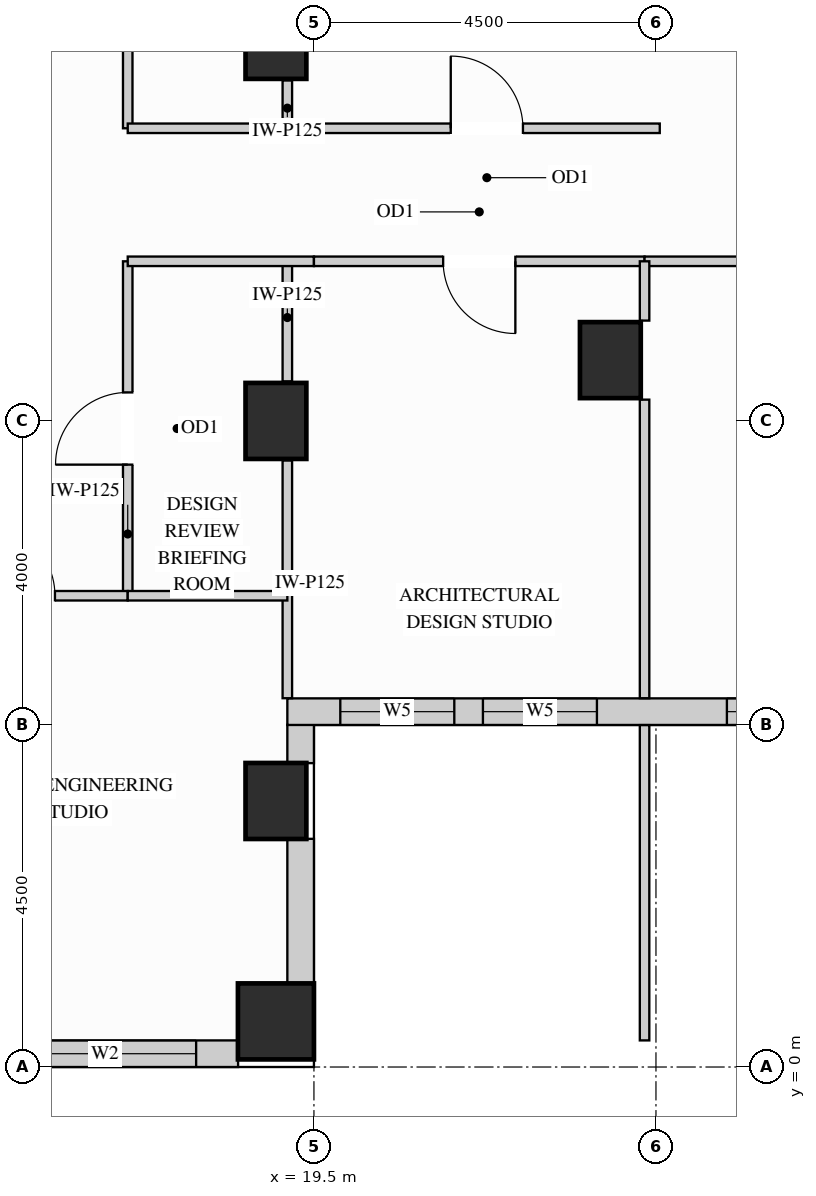
"""IFC4 building model, lengths in metres.
Left out: names, types, materials, properties, quantities, classifications, styles, units other than length and angle.
Written with IfcOpenShell. Run it as: python <this file> out.ifc"""

import sys

from ifc_helpers import new_model, si_unit, direction, frame, frame_2d, origin, origin_2d, place, context, subcontext, project, spatial, rectangle, extrude, source, transform, mapped, element, fill, save


model = new_model("IFC4")
c1 = context("Model", 3, precision=1e-05, world=origin(), true_north=direction((0.0, 1.0)))
c2 = subcontext(c1, "Body", "Model", "MODEL_VIEW")
j1 = project(units=[si_unit("LENGTHUNIT", "METRE"), si_unit("PLANEANGLEUNIT", "RADIAN")], contexts=[c1])
p1 = place(None, origin())
s1 = spatial("IfcSite", under=j1, at=p1, CompositionType="ELEMENT")
p2 = place(p1, origin())
s2 = spatial("IfcBuilding", under=s1, at=p2, CompositionType="ELEMENT")
p3 = place(p2, frame((0.0, 0.0, 150.3)))
s3 = spatial("IfcBuildingStorey", under=s2, at=p3, CompositionType="ELEMENT", Elevation=150.3)
m1 = source(origin(), c2, "Body", "SweptSolid", [
    extrude(rectangle(XDim=0.8, YDim=1.0, at=origin_2d()), origin(), (0.0, 0.0, 1.0), 3.4),
])
for number, where, z_axis, x_axis in (
    (1, (19.0, 13.5, 0.0), (0.0, 0.0, 1.0), (1.0, 0.0, 0.0)),
    (2, (19.0, 3.5, 0.0), (0.0, 0.0, 1.0), (1.0, 0.0, 0.0)),
    (3, (19.0, 8.5, 0.0), (0.0, 0.0, 1.0), (1.0, 0.0, 0.0)),
    (4, (23.4, 9.3, 0.0), (0.0, 0.0, 1.0), (1.0, 0.0, 0.0)),
):
    element("IfcColumn", number, at=place(p3, frame(where, z_axis=z_axis, x_axis=x_axis)), inside=s3, PredefinedType="COLUMN", context=c2, shape_type="MappedRepresentation", body=[
        mapped(m1, transform((0.0, 0.0, 0.0), x_axis=(1.0, 0.0, 0.0), y_axis=(0.0, 1.0, 0.0), z_axis=(0.0, 0.0, 1.0))),
    ])
m2 = source(origin(), c2, "Body", "SweptSolid", [
    extrude(rectangle(XDim=1.0, YDim=1.0, at=origin_2d()), origin(), (0.0, 0.0, 1.0), 3.4),
])
p4 = place(p3, frame((19.0, 0.6, 0.0), z_axis=(0.0, 0.0, 1.0), x_axis=(1.0, 0.0, 0.0)))
e5 = element("IfcColumn", 5, at=p4, inside=s3, PredefinedType="COLUMN", context=c2, shape_type="MappedRepresentation", body=[
    mapped(m2, transform((0.0, 0.0, 0.0), x_axis=(1.0, 0.0, 0.0), y_axis=(0.0, 1.0, 0.0), z_axis=(0.0, 0.0, 1.0))),
])
p5 = place(p3, frame((14.998, 0.175, 0.0), z_axis=(0.0, 0.0, 1.0), x_axis=(1.0, 0.0, 0.0)))
e6 = element("IfcWall", 6, at=p5, inside=s3, PredefinedType="SOLIDWALL", context=c2, shape_type="SweptSolid", body=[
    extrude(rectangle(XDim=3.504, YDim=0.35, at=frame_2d((1.752, 0.0))), origin(), (0.0, 0.0, 1.0), 2.612),
])
p6 = place(p5, frame((0.552, 0.0, 0.78)))
e7 = element("IfcOpeningElement", 7, at=p6, cuts=e6, PredefinedType="OPENING", context=c2, shape_type="SweptSolid", body=[
    extrude(rectangle(XDim=2.4, YDim=1.652, at=frame_2d((1.2, 0.826))), frame((0.0, 0.185, 0.0), z_axis=(0.0, -1.0, 0.0), x_axis=(1.0, 0.0, 0.0)), (0.0, 0.0, 1.0), 0.37),
])
m3 = source(origin(), c2, "Body", "SweptSolid", [
    extrude(rectangle(XDim=1.904, YDim=0.35, at=frame_2d((0.952, 0.0))), origin(), (0.0, 0.0, 1.0), 2.612),
])
p7 = place(p3, frame((19.325, 1.098, 0.0), z_axis=(0.0, 0.0, 1.0), x_axis=(0.0, 1.0, 0.0)))
e8 = element("IfcWall", 8, at=p7, inside=s3, PredefinedType="SOLIDWALL", context=c2, shape_type="MappedRepresentation", body=[
    mapped(m3, transform((0.0, 0.0, 0.0), x_axis=(1.0, 0.0, 0.0), y_axis=(0.0, 1.0, 0.0), z_axis=(0.0, 0.0, 1.0))),
])
m4 = source(origin(), c2, "Body", "SweptSolid", [
    extrude(rectangle(XDim=0.504, YDim=0.35, at=frame_2d((0.252, 0.0))), origin(), (0.0, 0.0, 1.0), 2.773),
])
p8 = place(p3, frame((19.325, 3.998, 0.0), z_axis=(0.0, 0.0, 1.0), x_axis=(0.0, 1.0, 0.0)))
e9 = element("IfcWall", 9, at=p8, inside=s3, PredefinedType="SOLIDWALL", context=c2, shape_type="MappedRepresentation", body=[
    mapped(m4, transform((0.0, 0.0, 0.0), x_axis=(1.0, 0.0, 0.0), y_axis=(0.0, 1.0, 0.0), z_axis=(0.0, 0.0, 1.0))),
])
p9 = place(p3, frame((19.15, 4.675, 0.0), z_axis=(0.0, 0.0, 1.0), x_axis=(1.0, 0.0, 0.0)))
e10 = element("IfcWall", 10, at=p9, inside=s3, PredefinedType="SOLIDWALL", context=c2, shape_type="SweptSolid", body=[
    extrude(rectangle(XDim=15.6, YDim=0.35, at=frame_2d((7.8, 0.0))), origin(), (0.0, 0.0, 1.0), 3.385),
])
p10 = place(p9, frame((0.697, 0.0, 0.78)))
e11 = element("IfcOpeningElement", 11, at=p10, cuts=e10, PredefinedType="OPENING", context=c2, shape_type="SweptSolid", body=[
    extrude(rectangle(XDim=1.5, YDim=2.0, at=frame_2d((0.75, 1.0))), frame((0.0, 0.185, 0.0), z_axis=(0.0, -1.0, 0.0), x_axis=(1.0, 0.0, 0.0)), (0.0, 0.0, 1.0), 0.37),
])
p11 = place(p9, frame((2.573, 0.0, 0.78)))
e12 = element("IfcOpeningElement", 12, at=p11, cuts=e10, PredefinedType="OPENING", context=c2, shape_type="SweptSolid", body=[
    extrude(rectangle(XDim=1.5, YDim=2.0, at=frame_2d((0.75, 1.0))), frame((0.0, 0.185, 0.0), z_axis=(0.0, -1.0, 0.0), x_axis=(1.0, 0.0, 0.0)), (0.0, 0.0, 1.0), 0.37),
])
p12 = place(p9, frame((5.783, 0.0, 0.78)))
e13 = element("IfcOpeningElement", 13, at=p12, cuts=e10, PredefinedType="OPENING", context=c2, shape_type="SweptSolid", body=[
    extrude(rectangle(XDim=1.5, YDim=2.0, at=frame_2d((0.75, 1.0))), frame((0.0, 0.185, 0.0), z_axis=(0.0, -1.0, 0.0), x_axis=(1.0, 0.0, 0.0)), (0.0, 0.0, 1.0), 0.37),
])
p13 = place(p9, frame((8.117, 0.0, 0.78)))
e14 = element("IfcOpeningElement", 14, at=p13, cuts=e10, PredefinedType="OPENING", context=c2, shape_type="SweptSolid", body=[
    extrude(rectangle(XDim=1.5, YDim=2.0, at=frame_2d((0.75, 1.0))), frame((0.0, 0.185, 0.0), z_axis=(0.0, -1.0, 0.0), x_axis=(1.0, 0.0, 0.0)), (0.0, 0.0, 1.0), 0.37),
])
p14 = place(p9, frame((11.393, 0.0, 0.78)))
e15 = element("IfcOpeningElement", 15, at=p14, cuts=e10, PredefinedType="OPENING", context=c2, shape_type="SweptSolid", body=[
    extrude(rectangle(XDim=1.5, YDim=2.0, at=frame_2d((0.75, 1.0))), frame((0.0, 0.185, 0.0), z_axis=(0.0, -1.0, 0.0), x_axis=(1.0, 0.0, 0.0)), (0.0, 0.0, 1.0), 0.37),
])
p15 = place(p9, frame((13.337, 0.0, 0.78)))
e16 = element("IfcOpeningElement", 16, at=p15, cuts=e10, PredefinedType="OPENING", context=c2, shape_type="SweptSolid", body=[
    extrude(rectangle(XDim=1.5, YDim=2.0, at=frame_2d((0.75, 1.0))), frame((0.0, 0.185, 0.0), z_axis=(0.0, -1.0, 0.0), x_axis=(1.0, 0.0, 0.0)), (0.0, 0.0, 1.0), 0.37),
])
m5 = source(origin(), c2, "Body", "SweptSolid", [
    extrude(rectangle(XDim=0.63, YDim=0.125, at=frame_2d((0.315, 0.0))), origin(), (0.0, 0.0, 1.0), 2.773),
])
p16 = place(p3, frame((19.15, 12.35, 0.0), z_axis=(0.0, 0.0, 1.0), x_axis=(0.0, 1.0, 0.0)))
e17 = element("IfcWall", 17, at=p16, inside=s3, PredefinedType="PARTITIONING", context=c2, shape_type="MappedRepresentation", body=[
    mapped(m5, transform((0.0, 0.0, 0.0), x_axis=(1.0, 0.0, 0.0), y_axis=(0.0, 1.0, 0.0), z_axis=(0.0, 0.0, 1.0))),
])
m6 = source(origin(), c2, "Body", "SweptSolid", [
    extrude(rectangle(XDim=3.128, YDim=0.125, at=frame_2d((1.564, 0.0))), origin(), (0.0, 0.0, 1.0), 2.773),
])
p17 = place(p3, frame((19.15, 4.852, 0.0), z_axis=(0.0, 0.0, 1.0), x_axis=(0.0, 1.0, 0.0)))
e18 = element("IfcWall", 18, at=p17, inside=s3, PredefinedType="PARTITIONING", context=c2, shape_type="MappedRepresentation", body=[
    mapped(m6, transform((0.0, 0.0, 0.0), x_axis=(1.0, 0.0, 0.0), y_axis=(0.0, 1.0, 0.0), z_axis=(0.0, 0.0, 1.0))),
])
m7 = source(origin(), c2, "Body", "SweptSolid", [
    extrude(rectangle(XDim=1.58, YDim=0.125, at=frame_2d((0.79, 0.0))), origin(), (0.0, 0.0, 1.0), 2.773),
])
p18 = place(p3, frame((19.15, 9.02, 0.0), z_axis=(0.0, 0.0, 1.0), x_axis=(0.0, 1.0, 0.0)))
e19 = element("IfcWall", 19, at=p18, inside=s3, PredefinedType="PARTITIONING", context=c2, shape_type="MappedRepresentation", body=[
    mapped(m7, transform((0.0, 0.0, 0.0), x_axis=(1.0, 0.0, 0.0), y_axis=(0.0, 1.0, 0.0), z_axis=(0.0, 0.0, 1.0))),
])
p19 = place(p3, frame((17.05, 12.35, 0.0), z_axis=(0.0, 0.0, 1.0), x_axis=(0.0, 1.0, 0.0)))
e20 = element("IfcWall", 20, at=p19, inside=s3, PredefinedType="PARTITIONING", context=c2, shape_type="SweptSolid", body=[
    extrude(rectangle(XDim=3.15, YDim=0.125, at=frame_2d((1.575, 0.0))), origin(), (0.0, 0.0, 1.0), 3.385),
])
p20 = place(p19, frame((1.1, 0.0, 0.0)))
e21 = element("IfcOpeningElement", 21, at=p20, cuts=e20, PredefinedType="OPENING", context=c2, shape_type="SweptSolid", body=[
    extrude(rectangle(XDim=0.95, YDim=2.15, at=frame_2d((0.475, 1.075))), frame((0.0, 0.073, 0.0), z_axis=(0.0, -1.0, 0.0), x_axis=(1.0, 0.0, 0.0)), (0.0, 0.0, 1.0), 0.145),
])
p21 = place(p3, frame((17.05, 6.2, 0.0), z_axis=(0.0, 0.0, 1.0), x_axis=(0.0, 1.0, 0.0)))
e22 = element("IfcWall", 22, at=p21, inside=s3, PredefinedType="PARTITIONING", context=c2, shape_type="SweptSolid", body=[
    extrude(rectangle(XDim=4.4, YDim=0.125, at=frame_2d((2.2, 0.0))), origin(), (0.0, 0.0, 1.0), 3.385),
])
p22 = place(p21, frame((1.725, 0.0, 0.0)))
e23 = element("IfcOpeningElement", 23, at=p22, cuts=e22, PredefinedType="OPENING", context=c2, shape_type="SweptSolid", body=[
    extrude(rectangle(XDim=0.95, YDim=2.15, at=frame_2d((0.475, 1.075))), frame((0.0, 0.073, 0.0), z_axis=(0.0, -1.0, 0.0), x_axis=(1.0, 0.0, 0.0)), (0.0, 0.0, 1.0), 0.145),
])
m8 = source(origin(), c2, "Body", "SweptSolid", [
    extrude(rectangle(XDim=2.45, YDim=0.125, at=frame_2d((1.225, 0.0))), origin(), (0.0, 0.0, 1.0), 3.385),
])
p23 = place(p3, frame((17.05, 12.35, 0.0), z_axis=(0.0, 0.0, 1.0), x_axis=(1.0, 0.0, 0.0)))
e24 = element("IfcWall", 24, at=p23, inside=s3, PredefinedType="PARTITIONING", context=c2, shape_type="MappedRepresentation", body=[
    mapped(m8, transform((0.0, 0.0, 0.0), x_axis=(1.0, 0.0, 0.0), y_axis=(0.0, 1.0, 0.0), z_axis=(0.0, 0.0, 1.0))),
])
p24 = place(p3, frame((19.5, 12.35, 0.0), z_axis=(0.0, 0.0, 1.0), x_axis=(1.0, 0.0, 0.0)))
e25 = element("IfcWall", 25, at=p24, inside=s3, PredefinedType="PARTITIONING", context=c2, shape_type="SweptSolid", body=[
    extrude(rectangle(XDim=4.55, YDim=0.125, at=frame_2d((2.275, 0.0))), origin(), (0.0, 0.0, 1.0), 3.385),
])
p25 = place(p24, frame((1.8, 0.0, 0.0)))
e26 = element("IfcOpeningElement", 26, at=p25, cuts=e25, PredefinedType="OPENING", context=c2, shape_type="SweptSolid", body=[
    extrude(rectangle(XDim=0.95, YDim=2.15, at=frame_2d((0.475, 1.075))), frame((0.0, 0.073, 0.0), z_axis=(0.0, -1.0, 0.0), x_axis=(1.0, 0.0, 0.0)), (0.0, 0.0, 1.0), 0.145),
])
p26 = place(p3, frame((17.05, 10.6, 0.0), z_axis=(0.0, 0.0, 1.0), x_axis=(1.0, 0.0, 0.0)))
e27 = element("IfcWall", 27, at=p26, inside=s3, PredefinedType="PARTITIONING", context=c2, shape_type="MappedRepresentation", body=[
    mapped(m8, transform((0.0, 0.0, 0.0), x_axis=(1.0, 0.0, 0.0), y_axis=(0.0, 1.0, 0.0), z_axis=(0.0, 0.0, 1.0))),
])
p27 = place(p3, frame((19.5, 10.6, 0.0), z_axis=(0.0, 0.0, 1.0), x_axis=(1.0, 0.0, 0.0)))
e28 = element("IfcWall", 28, at=p27, inside=s3, PredefinedType="PARTITIONING", context=c2, shape_type="SweptSolid", body=[
    extrude(rectangle(XDim=4.35, YDim=0.125, at=frame_2d((2.175, 0.0))), origin(), (0.0, 0.0, 1.0), 3.385),
])
p28 = place(p27, frame((1.7, 0.0, 0.0)))
e29 = element("IfcOpeningElement", 29, at=p28, cuts=e28, PredefinedType="OPENING", context=c2, shape_type="SweptSolid", body=[
    extrude(rectangle(XDim=0.95, YDim=2.15, at=frame_2d((0.475, 1.075))), frame((0.0, 0.073, 0.0), z_axis=(0.0, -1.0, 0.0), x_axis=(1.0, 0.0, 0.0)), (0.0, 0.0, 1.0), 0.145),
])
p29 = place(p3, frame((23.85, 10.6, 0.0), z_axis=(0.0, 0.0, 1.0), x_axis=(1.0, 0.0, 0.0)))
e30 = element("IfcWall", 30, at=p29, inside=s3, PredefinedType="PARTITIONING", context=c2, shape_type="SweptSolid", body=[
    extrude(rectangle(XDim=6.0, YDim=0.125, at=frame_2d((3.0, 0.0))), origin(), (0.0, 0.0, 1.0), 3.385),
])
p30 = place(p29, frame((2.525, 0.0, 0.0)))
e31 = element("IfcOpeningElement", 31, at=p30, cuts=e30, PredefinedType="OPENING", context=c2, shape_type="SweptSolid", body=[
    extrude(rectangle(XDim=0.95, YDim=2.15, at=frame_2d((0.475, 1.075))), frame((0.0, 0.073, 0.0), z_axis=(0.0, -1.0, 0.0), x_axis=(1.0, 0.0, 0.0)), (0.0, 0.0, 1.0), 0.145),
])
m9 = source(origin(), c2, "Body", "SweptSolid", [
    extrude(rectangle(XDim=4.148, YDim=0.125, at=frame_2d((2.074, 0.0))), origin(), (0.0, 0.0, 1.0), 3.385),
])
p31 = place(p3, frame((23.85, 0.35, 0.0), z_axis=(0.0, 0.0, 1.0), x_axis=(0.0, 1.0, 0.0)))
e32 = element("IfcWall", 32, at=p31, inside=s3, PredefinedType="PARTITIONING", context=c2, shape_type="MappedRepresentation", body=[
    mapped(m9, transform((0.0, 0.0, 0.0), x_axis=(1.0, 0.0, 0.0), y_axis=(0.0, 1.0, 0.0), z_axis=(0.0, 0.0, 1.0))),
])
m10 = source(origin(), c2, "Body", "SweptSolid", [
    extrude(rectangle(XDim=3.928, YDim=0.125, at=frame_2d((1.964, 0.0))), origin(), (0.0, 0.0, 1.0), 3.385),
])
p32 = place(p3, frame((23.85, 4.852, 0.0), z_axis=(0.0, 0.0, 1.0), x_axis=(0.0, 1.0, 0.0)))
e33 = element("IfcWall", 33, at=p32, inside=s3, PredefinedType="PARTITIONING", context=c2, shape_type="MappedRepresentation", body=[
    mapped(m10, transform((0.0, 0.0, 0.0), x_axis=(1.0, 0.0, 0.0), y_axis=(0.0, 1.0, 0.0), z_axis=(0.0, 0.0, 1.0))),
])
m11 = source(origin(), c2, "Body", "SweptSolid", [
    extrude(rectangle(XDim=0.78, YDim=0.125, at=frame_2d((0.39, 0.0))), origin(), (0.0, 0.0, 1.0), 3.385),
])
p33 = place(p3, frame((23.85, 9.82, 0.0), z_axis=(0.0, 0.0, 1.0), x_axis=(0.0, 1.0, 0.0)))
e34 = element("IfcWall", 34, at=p33, inside=s3, PredefinedType="PARTITIONING", context=c2, shape_type="MappedRepresentation", body=[
    mapped(m11, transform((0.0, 0.0, 0.0), x_axis=(1.0, 0.0, 0.0), y_axis=(0.0, 1.0, 0.0), z_axis=(0.0, 0.0, 1.0))),
])
p34 = place(p3, frame((14.185, 6.2, 0.0), z_axis=(0.0, 0.0, 1.0), x_axis=(1.0, 0.0, 0.0)))
e35 = element("IfcWall", 35, at=p34, inside=s3, PredefinedType="PARTITIONING", context=c2, shape_type="SweptSolid", body=[
    extrude(rectangle(XDim=2.865, YDim=0.125, at=frame_2d((1.433, 0.0))), origin(), (0.0, 0.0, 1.0), 2.848),
])
p35 = place(p34, frame((0.958, 0.0, 0.0)))
e36 = element("IfcOpeningElement", 36, at=p35, cuts=e35, PredefinedType="OPENING", context=c2, shape_type="SweptSolid", body=[
    extrude(rectangle(XDim=0.95, YDim=2.15, at=frame_2d((0.475, 1.075))), frame((0.0, 0.073, 0.0), z_axis=(0.0, -1.0, 0.0), x_axis=(1.0, 0.0, 0.0)), (0.0, 0.0, 1.0), 0.145),
])
m12 = source(origin(), c2, "Body", "SweptSolid", [
    extrude(rectangle(XDim=2.1, YDim=0.125, at=frame_2d((1.05, 0.0))), origin(), (0.0, 0.0, 1.0), 2.848),
])
p36 = place(p3, frame((17.05, 6.2, 0.0), z_axis=(0.0, 0.0, 1.0), x_axis=(1.0, 0.0, 0.0)))
e37 = element("IfcWall", 37, at=p36, inside=s3, PredefinedType="PARTITIONING", context=c2, shape_type="MappedRepresentation", body=[
    mapped(m12, transform((0.0, 0.0, 0.0), x_axis=(1.0, 0.0, 0.0), y_axis=(0.0, 1.0, 0.0), z_axis=(0.0, 0.0, 1.0))),
])
m13 = source(origin(), c2, "Body", "SweptSolid", [
    extrude(rectangle(XDim=0.95, YDim=2.15, at=frame_2d((0.475, 1.075))), frame((0.0, 0.025, 0.0), z_axis=(0.0, -1.0, 0.0), x_axis=(1.0, 0.0, 0.0)), (0.0, 0.0, 1.0), 0.05),
])
p37 = place(p22, origin())
e38 = element("IfcDoor", 38, at=p37, inside=s3, OperationType="SINGLE_SWING_LEFT", PredefinedType="DOOR", context=c2, shape_type="MappedRepresentation", body=[
    mapped(m13, transform((0.0, 0.0, 0.0), x_axis=(1.0, 0.0, 0.0), y_axis=(0.0, 1.0, 0.0), z_axis=(0.0, 0.0, 1.0))),
])
fill(e23, e38)
p38 = place(p35, origin())
e39 = element("IfcDoor", 39, at=p38, inside=s3, OperationType="SINGLE_SWING_LEFT", PredefinedType="DOOR", context=c2, shape_type="MappedRepresentation", body=[
    mapped(m13, transform((0.0, 0.0, 0.0), x_axis=(1.0, 0.0, 0.0), y_axis=(0.0, 1.0, 0.0), z_axis=(0.0, 0.0, 1.0))),
])
fill(e36, e39)
p39 = place(p25, origin())
e40 = element("IfcDoor", 40, at=p39, inside=s3, OperationType="SINGLE_SWING_LEFT", PredefinedType="DOOR", context=c2, shape_type="MappedRepresentation", body=[
    mapped(m13, transform((0.0, 0.0, 0.0), x_axis=(1.0, 0.0, 0.0), y_axis=(0.0, 1.0, 0.0), z_axis=(0.0, 0.0, 1.0))),
])
fill(e26, e40)
p40 = place(p28, origin())
e41 = element("IfcDoor", 41, at=p40, inside=s3, OperationType="SINGLE_SWING_RIGHT", PredefinedType="DOOR", context=c2, shape_type="MappedRepresentation", body=[
    mapped(m13, transform((0.0, 0.0, 0.0), x_axis=(1.0, 0.0, 0.0), y_axis=(0.0, 1.0, 0.0), z_axis=(0.0, 0.0, 1.0))),
])
fill(e29, e41)
m14 = source(origin(), c2, "Body", "SweptSolid", [
    extrude(rectangle(XDim=2.4, YDim=1.652, at=frame_2d((1.2, 0.826))), frame((0.0, 0.03, 0.0), z_axis=(0.0, -1.0, 0.0), x_axis=(1.0, 0.0, 0.0)), (0.0, 0.0, 1.0), 0.06),
])
p41 = place(p6, origin())
e42 = element("IfcWindow", 42, at=p41, inside=s3, PartitioningType="SINGLE_PANEL", PredefinedType="WINDOW", context=c2, shape_type="MappedRepresentation", body=[
    mapped(m14, transform((0.0, 0.0, 0.0), x_axis=(1.0, 0.0, 0.0), y_axis=(0.0, 1.0, 0.0), z_axis=(0.0, 0.0, 1.0))),
])
fill(e7, e42)
m15 = source(origin(), c2, "Body", "SweptSolid", [
    extrude(rectangle(XDim=1.5, YDim=2.0, at=frame_2d((0.75, 1.0))), frame((0.0, 0.03, 0.0), z_axis=(0.0, -1.0, 0.0), x_axis=(1.0, 0.0, 0.0)), (0.0, 0.0, 1.0), 0.06),
])
p42 = place(p10, origin())
e43 = element("IfcWindow", 43, at=p42, inside=s3, PartitioningType="SINGLE_PANEL", PredefinedType="WINDOW", context=c2, shape_type="MappedRepresentation", body=[
    mapped(m15, transform((0.0, 0.0, 0.0), x_axis=(1.0, 0.0, 0.0), y_axis=(0.0, 1.0, 0.0), z_axis=(0.0, 0.0, 1.0))),
])
fill(e11, e43)
p43 = place(p11, origin())
e44 = element("IfcWindow", 44, at=p43, inside=s3, PartitioningType="SINGLE_PANEL", PredefinedType="WINDOW", context=c2, shape_type="MappedRepresentation", body=[
    mapped(m15, transform((0.0, 0.0, 0.0), x_axis=(1.0, 0.0, 0.0), y_axis=(0.0, 1.0, 0.0), z_axis=(0.0, 0.0, 1.0))),
])
fill(e12, e44)
p44 = place(p12, origin())
e45 = element("IfcWindow", 45, at=p44, inside=s3, PartitioningType="SINGLE_PANEL", PredefinedType="WINDOW", context=c2, shape_type="MappedRepresentation", body=[
    mapped(m15, transform((0.0, 0.0, 0.0), x_axis=(1.0, 0.0, 0.0), y_axis=(0.0, 1.0, 0.0), z_axis=(0.0, 0.0, 1.0))),
])
fill(e13, e45)
save(model, sys.argv[1])
